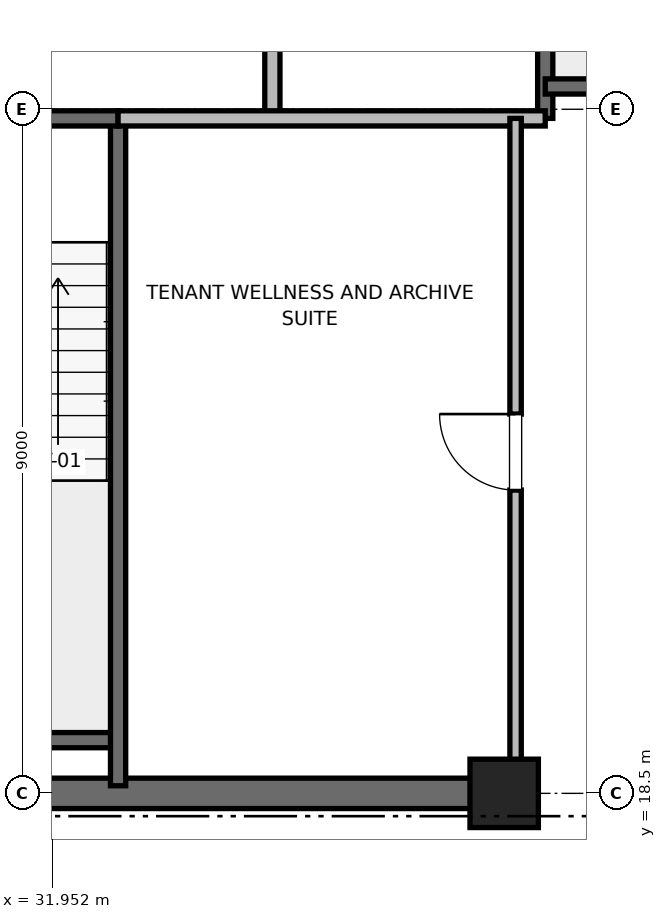
"""IFC4 building model, lengths in metres.
Left out: names, types, materials, properties, quantities, classifications, styles, units other than length and angle.
Written with IfcOpenShell. Run it as: python <this file> out.ifc"""

import sys

from ifc_helpers import new_model, si_unit, direction, frame, frame_2d, origin, origin_2d, place, context, subcontext, project, spatial, rectangle, extrude, element, fill, save


model = new_model("IFC4")
c1 = context("Model", 3, precision=1e-05, world=origin(), true_north=direction((0.0, 1.0)))
c2 = subcontext(c1, "Body", "Model", "MODEL_VIEW")
j1 = project(units=[si_unit("LENGTHUNIT", "METRE"), si_unit("PLANEANGLEUNIT", "RADIAN")], contexts=[c1])
p1 = place(None, origin())
s1 = spatial("IfcSite", under=j1, at=p1, CompositionType="ELEMENT")
p2 = place(p1, origin())
s2 = spatial("IfcBuilding", under=s1, at=p2, CompositionType="ELEMENT")
p3 = place(p2, frame((0.0, 0.0, 334.8)))
s3 = spatial("IfcBuildingStorey", under=s2, at=p3, CompositionType="ELEMENT", Elevation=334.8)
p4 = place(p3, frame((37.9, 18.5, 0.0), z_axis=(0.0, 0.0, 1.0), x_axis=(1.0, 0.0, 0.0)))
e1 = element("IfcColumn", 1, at=p4, inside=s3, PredefinedType="PILASTER", context=c2, shape_type="SweptSolid", body=[
    extrude(rectangle(XDim=0.9, YDim=0.9, at=origin_2d()), origin(), (0.0, 0.0, 1.0), 4.0),
])
p5 = place(p3, frame((29.0, 18.5, 0.0), z_axis=(0.0, 0.0, 1.0), x_axis=(1.0, 0.0, 0.0)))
e2 = element("IfcWall", 2, at=p5, inside=s3, PredefinedType="SHEAR", context=c2, shape_type="SweptSolid", body=[
    extrude(rectangle(XDim=9.2, YDim=0.4, at=frame_2d((4.6, 0.0))), origin(), (0.0, 0.0, 1.0), 3.785),
])
p6 = place(p3, frame((29.7, 19.2, 0.0), z_axis=(0.0, 0.0, 1.0), x_axis=(1.0, 0.0, 0.0)))
e3 = element("IfcWall", 3, at=p6, inside=s3, PredefinedType="SOLIDWALL", context=c2, shape_type="SweptSolid", body=[
    extrude(rectangle(XDim=3.12, YDim=0.2, at=frame_2d((1.56, 0.0))), origin(), (0.0, 0.0, 1.0), 3.785),
])
p7 = place(p3, frame((32.82, 18.6, 0.0), z_axis=(0.0, 0.0, 1.0), x_axis=(0.0, 1.0, 0.0)))
e4 = element("IfcWall", 4, at=p7, inside=s3, PredefinedType="SOLIDWALL", context=c2, shape_type="SweptSolid", body=[
    extrude(rectangle(XDim=8.78, YDim=0.2, at=frame_2d((4.39, 0.0))), origin(), (0.0, 0.0, 1.0), 3.785),
])
p8 = place(p3, frame((29.7, 27.38, 0.0), z_axis=(0.0, 0.0, 1.0), x_axis=(1.0, 0.0, 0.0)))
e5 = element("IfcWall", 5, at=p8, inside=s3, PredefinedType="SOLIDWALL", context=c2, shape_type="SweptSolid", body=[
    extrude(rectangle(XDim=3.12, YDim=0.2, at=frame_2d((1.56, 0.0))), origin(), (0.0, 0.0, 1.0), 3.785),
])
p9 = place(p8, frame((1.01, 0.0, 0.0)))
e6 = element("IfcOpeningElement", 6, at=p9, cuts=e5, PredefinedType="OPENING", context=c2, shape_type="SweptSolid", body=[
    extrude(rectangle(XDim=1.1, YDim=2.15, at=frame_2d((0.55, 1.075))), frame((0.0, 0.1, 0.0), z_axis=(0.0, -1.0, 0.0), x_axis=(1.0, 0.0, 0.0)), (0.0, 0.0, 1.0), 0.2),
])
p10 = place(p3, frame((38.44, 27.38, 0.0), z_axis=(0.0, 0.0, 1.0), x_axis=(0.0, 1.0, 0.0)))
e7 = element("IfcWall", 7, at=p10, inside=s3, PredefinedType="SOLIDWALL", context=c2, shape_type="SweptSolid", body=[
    extrude(rectangle(XDim=8.87, YDim=0.2, at=frame_2d((4.435, 0.0))), origin(), (0.0, 0.0, 1.0), 3.785),
])
p11 = place(p3, frame((38.44, 27.8, 0.0), z_axis=(0.0, 0.0, 1.0), x_axis=(1.0, 0.0, 0.0)))
e8 = element("IfcWall", 8, at=p11, inside=s3, PredefinedType="SOLIDWALL", context=c2, shape_type="SweptSolid", body=[
    extrude(rectangle(XDim=3.32, YDim=0.2, at=frame_2d((1.66, 0.0))), origin(), (0.0, 0.0, 1.0), 3.785),
])
p12 = place(p3, frame((34.85, 27.38, 0.0), z_axis=(0.0, 0.0, 1.0), x_axis=(0.0, 1.0, 0.0)))
e9 = element("IfcWall", 9, at=p12, inside=s3, PredefinedType="PARTITIONING", context=c2, shape_type="SweptSolid", body=[
    extrude(rectangle(XDim=3.37, YDim=0.2, at=frame_2d((1.685, 0.0))), origin(), (0.0, 0.0, 1.0), 3.785),
])
p13 = place(p12, frame((1.11, 0.0, 0.0)))
e10 = element("IfcOpeningElement", 10, at=p13, cuts=e9, PredefinedType="OPENING", context=c2, shape_type="SweptSolid", body=[
    extrude(rectangle(XDim=1.15, YDim=2.2, at=frame_2d((0.575, 1.1))), frame((0.0, 0.1, 0.0), z_axis=(0.0, -1.0, 0.0), x_axis=(1.0, 0.0, 0.0)), (0.0, 0.0, 1.0), 0.2),
])
p14 = place(p3, frame((32.82, 27.38, 0.0), z_axis=(0.0, 0.0, 1.0), x_axis=(1.0, 0.0, 0.0)))
e11 = element("IfcWall", 11, at=p14, inside=s3, PredefinedType="PARTITIONING", context=c2, shape_type="SweptSolid", body=[
    extrude(rectangle(XDim=5.62, YDim=0.2, at=frame_2d((2.81, 0.0))), origin(), (0.0, 0.0, 1.0), 3.785),
])
p15 = place(p3, frame((38.05, 18.6, 0.0), z_axis=(0.0, 0.0, 1.0), x_axis=(0.0, 1.0, 0.0)))
e12 = element("IfcWall", 12, at=p15, inside=s3, PredefinedType="PARTITIONING", context=c2, shape_type="SweptSolid", body=[
    extrude(rectangle(XDim=8.78, YDim=0.15, at=frame_2d((4.39, 0.0))), origin(), (0.0, 0.0, 1.0), 2.85),
])
p16 = place(p15, frame((3.89, 0.0, 0.0)))
e13 = element("IfcOpeningElement", 13, at=p16, cuts=e12, PredefinedType="OPENING", context=c2, shape_type="SweptSolid", body=[
    extrude(rectangle(XDim=1.0, YDim=2.15, at=frame_2d((0.5, 1.075))), frame((0.0, 0.075, 0.0), z_axis=(0.0, -1.0, 0.0), x_axis=(1.0, 0.0, 0.0)), (0.0, 0.0, 1.0), 0.15),
])
p17 = place(p16, origin())
e14 = element("IfcDoor", 14, at=p17, inside=s3, OperationType="SINGLE_SWING_RIGHT", PredefinedType="DOOR", context=c2, shape_type="SweptSolid", body=[
    extrude(rectangle(XDim=1.0, YDim=2.15, at=frame_2d((0.5, 1.075))), frame((0.0, 0.025, 0.0), z_axis=(0.0, -1.0, 0.0), x_axis=(1.0, 0.0, 0.0)), (0.0, 0.0, 1.0), 0.05),
])
fill(e13, e14)
save(model, sys.argv[1])
